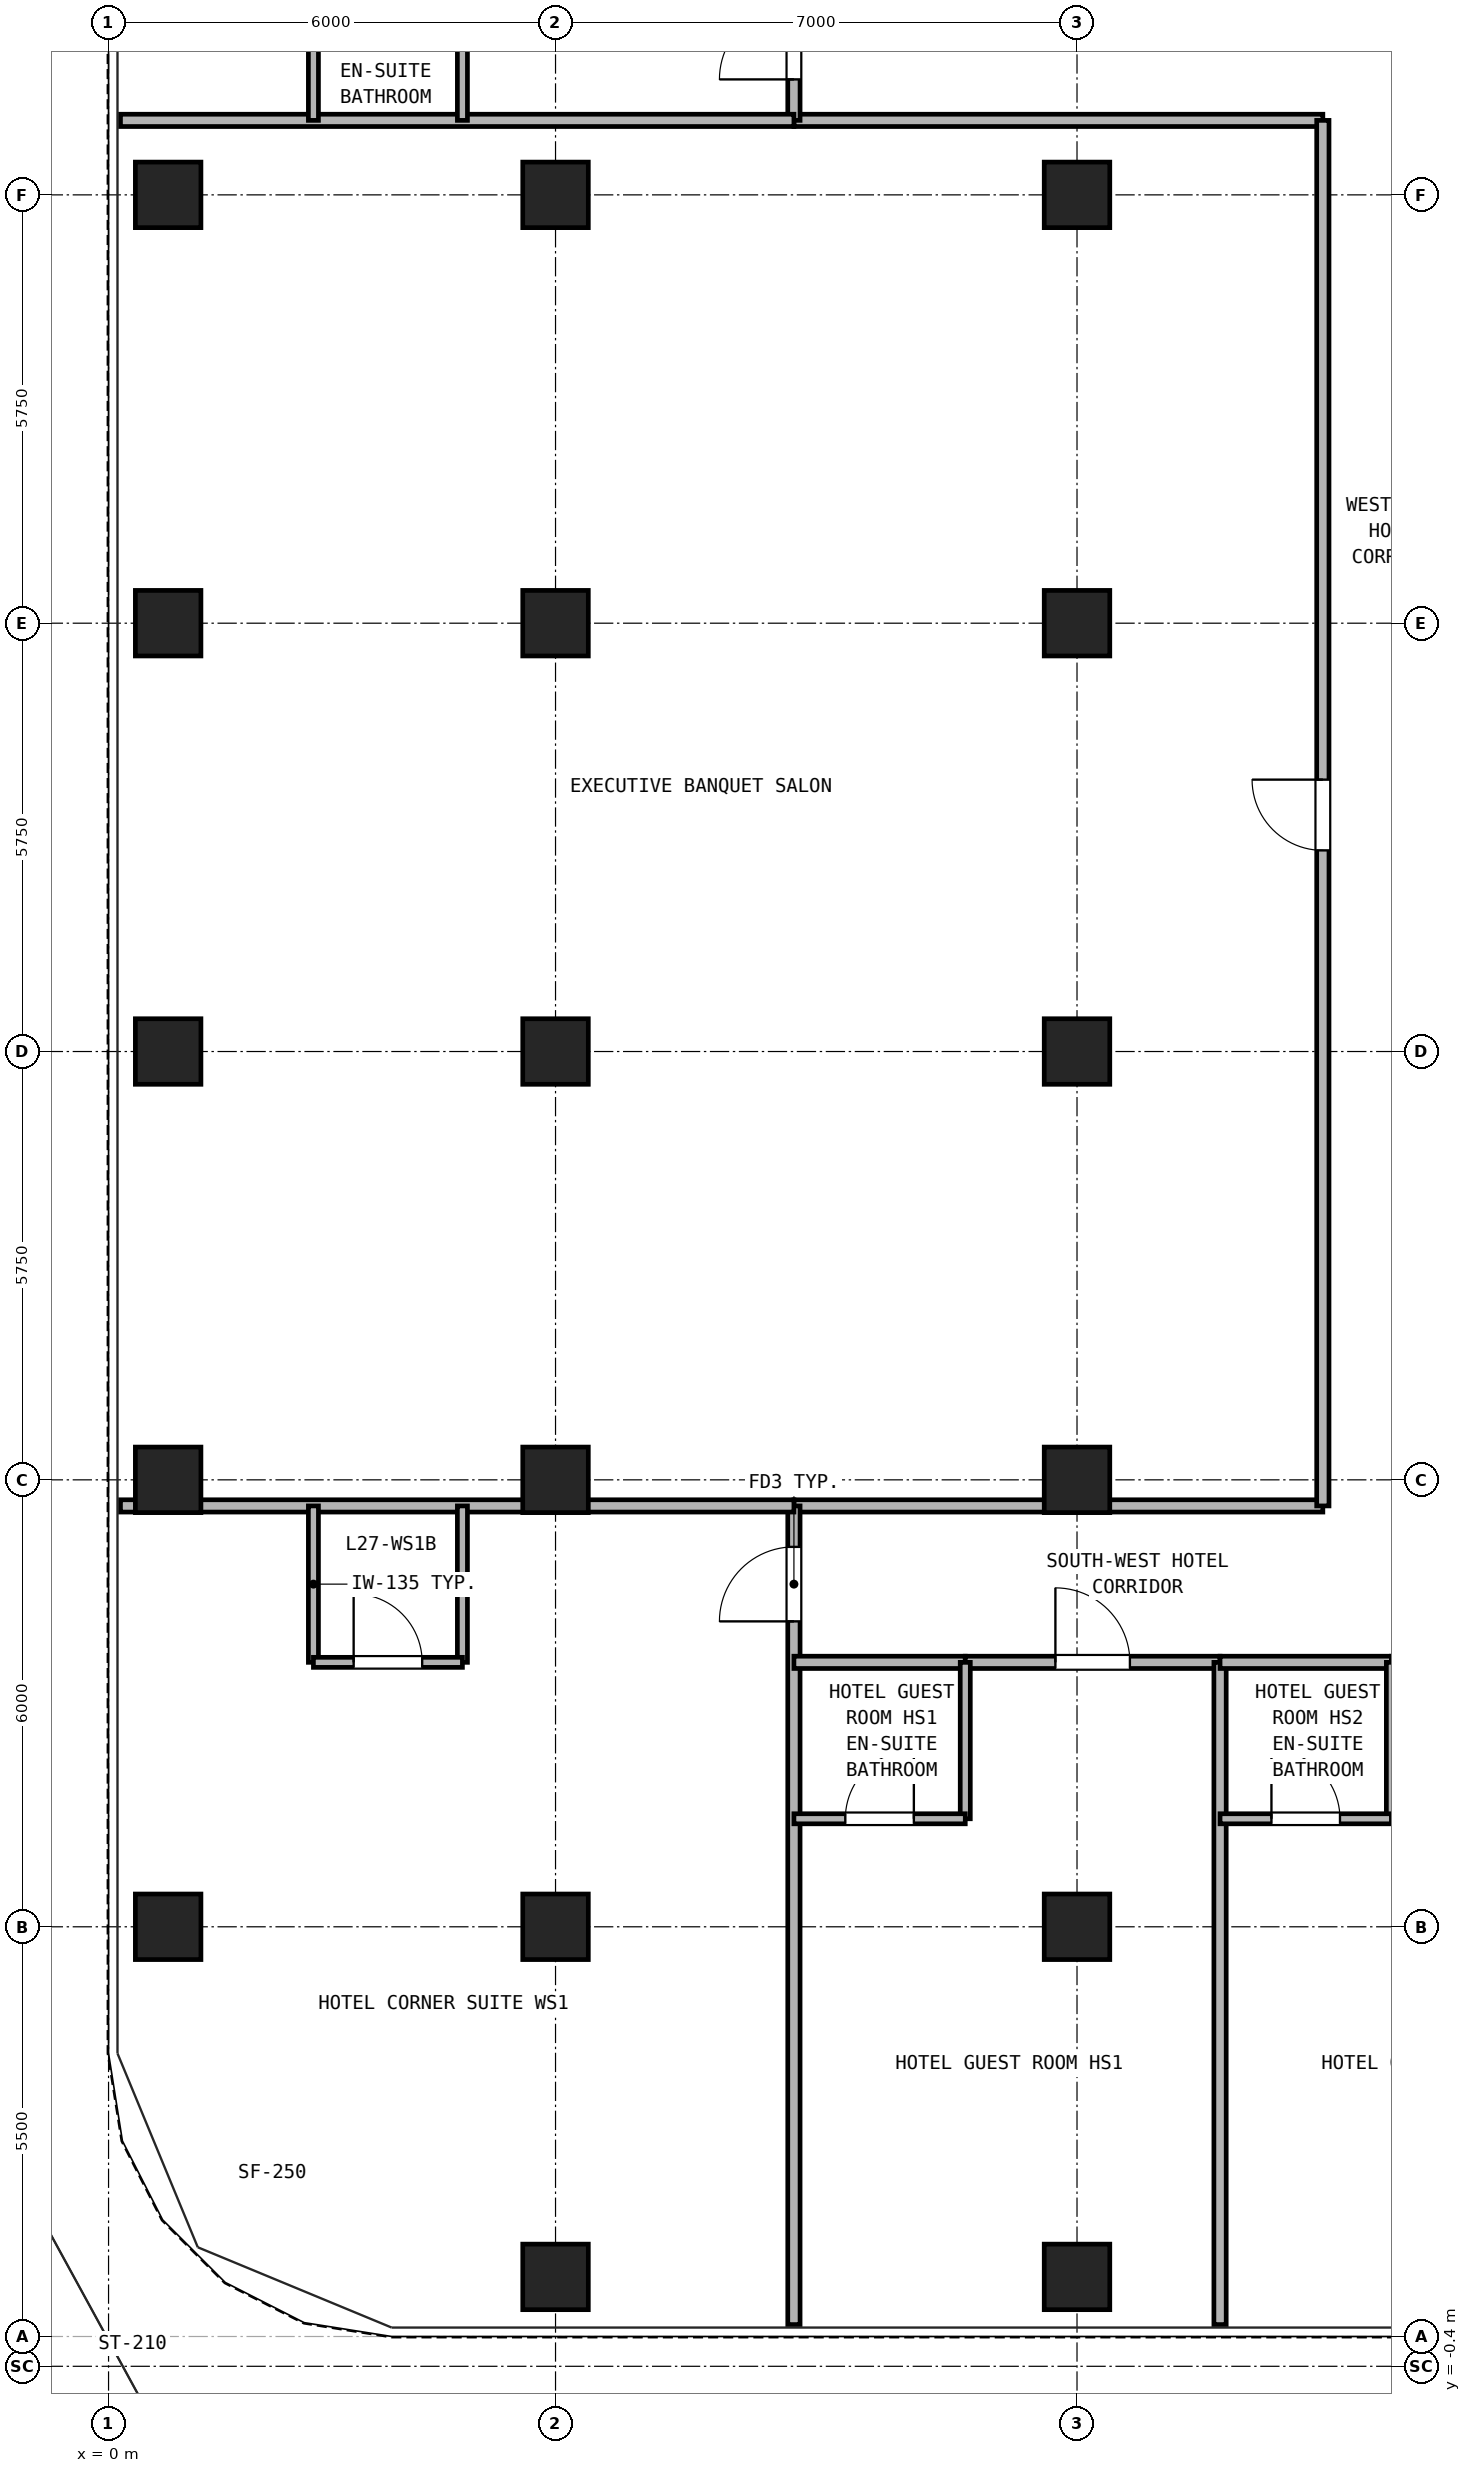
"""IFC4 building model, lengths in metres.
Left out: names, types, materials, properties, quantities, classifications, styles, units other than length and angle.
Written with IfcOpenShell. Run it as: python <this file> out.ifc"""

import sys

from ifc_helpers import new_model, si_unit, direction, frame, frame_2d, origin, origin_2d, place, context, subcontext, project, spatial, rectangle, hollow_rectangle, extrude, source, transform, mapped, element, fill, save


model = new_model("IFC4")
c1 = context("Model", 3, precision=1e-05, world=origin(), true_north=direction((0.0, 1.0)))
c2 = subcontext(c1, "Body", "Model", "MODEL_VIEW")
j1 = project(units=[si_unit("LENGTHUNIT", "METRE"), si_unit("PLANEANGLEUNIT", "RADIAN")], contexts=[c1])
p1 = place(None, origin())
s1 = spatial("IfcSite", under=j1, at=p1, CompositionType="ELEMENT")
p2 = place(p1, origin())
s2 = spatial("IfcBuilding", under=s1, at=p2, CompositionType="ELEMENT")
p3 = place(p2, frame((0.0, 0.0, 102.3)))
s3 = spatial("IfcBuildingStorey", under=s2, at=p3, CompositionType="ELEMENT", Elevation=102.3)
m1 = source(origin(), c2, "Body", "SweptSolid", [
    extrude(hollow_rectangle(XDim=0.88, YDim=0.88, WallThickness=0.05, at=origin_2d()), origin(), (0.0, 0.0, 1.0), 2.95),
])
for number, where, z_axis, x_axis in (
    (1, (6.0, 0.8, 0.0), (0.0, 0.0, 1.0), (1.0, 0.0, 0.0)),
    (2, (13.0, 0.8, 0.0), (0.0, 0.0, 1.0), (1.0, 0.0, 0.0)),
    (3, (0.8, 5.5, 0.0), (0.0, 0.0, 1.0), (1.0, 0.0, 0.0)),
    (4, (0.8, 11.5, 0.0), (0.0, 0.0, 1.0), (1.0, 0.0, 0.0)),
    (5, (0.8, 17.25, 0.0), (0.0, 0.0, 1.0), (1.0, 0.0, 0.0)),
    (6, (0.8, 23.0, 0.0), (0.0, 0.0, 1.0), (1.0, 0.0, 0.0)),
    (7, (0.8, 28.75, 0.0), (0.0, 0.0, 1.0), (1.0, 0.0, 0.0)),
    (8, (6.0, 5.5, 0.0), (0.0, 0.0, 1.0), (1.0, 0.0, 0.0)),
    (9, (6.0, 11.5, 0.0), (0.0, 0.0, 1.0), (1.0, 0.0, 0.0)),
    (10, (6.0, 17.25, 0.0), (0.0, 0.0, 1.0), (1.0, 0.0, 0.0)),
    (11, (6.0, 23.0, 0.0), (0.0, 0.0, 1.0), (1.0, 0.0, 0.0)),
    (12, (6.0, 28.75, 0.0), (0.0, 0.0, 1.0), (1.0, 0.0, 0.0)),
    (13, (13.0, 5.5, 0.0), (0.0, 0.0, 1.0), (1.0, 0.0, 0.0)),
    (14, (13.0, 11.5, 0.0), (0.0, 0.0, 1.0), (1.0, 0.0, 0.0)),
    (15, (13.0, 17.25, 0.0), (0.0, 0.0, 1.0), (1.0, 0.0, 0.0)),
    (16, (13.0, 23.0, 0.0), (0.0, 0.0, 1.0), (1.0, 0.0, 0.0)),
    (17, (13.0, 28.75, 0.0), (0.0, 0.0, 1.0), (1.0, 0.0, 0.0)),
):
    element("IfcColumn", number, at=place(p3, frame(where, z_axis=z_axis, x_axis=x_axis)), inside=s3, PredefinedType="COLUMN", context=c2, shape_type="MappedRepresentation", body=[
        mapped(m1, transform((0.0, 0.0, 0.0), x_axis=(1.0, 0.0, 0.0), y_axis=(0.0, 1.0, 0.0), z_axis=(0.0, 0.0, 1.0), scale=1.0)),
    ])
for number, where, z_axis, x_axis in (
    (18, (9.2, 11.15, 0.0), (0.0, 0.0, 1.0), (1.0, 0.0, 0.0)),
    (19, (9.2, 29.75, 0.0), (0.0, 0.0, 1.0), (1.0, 0.0, 0.0)),
):
    element("IfcWall", number, at=place(p3, frame(where, z_axis=z_axis, x_axis=x_axis)), inside=s3, PredefinedType="PARTITIONING", context=c2, shape_type="SweptSolid", body=[
        extrude(rectangle(XDim=7.1, YDim=0.165, at=frame_2d((3.55, 0.0))), origin(), (0.0, 0.0, 1.0), 2.95),
    ])
p4 = place(p3, frame((16.3, 11.15, 0.0), z_axis=(0.0, 0.0, 1.0), x_axis=(0.0, 1.0, 0.0)))
e20 = element("IfcWall", 20, at=p4, inside=s3, PredefinedType="PARTITIONING", context=c2, shape_type="SweptSolid", body=[
    extrude(rectangle(XDim=18.6, YDim=0.165, at=frame_2d((9.3, 0.0))), origin(), (0.0, 0.0, 1.0), 2.95),
])
p5 = place(p4, frame((8.8, 0.0, 0.0)))
e21 = element("IfcOpeningElement", 21, at=p5, cuts=e20, PredefinedType="OPENING", context=c2, shape_type="SweptSolid", body=[
    extrude(rectangle(XDim=0.95, YDim=2.15, at=frame_2d((0.475, 1.075))), frame((0.0, 0.093, 0.0), z_axis=(0.0, -1.0, 0.0), x_axis=(1.0, 0.0, 0.0)), (0.0, 0.0, 1.0), 0.185),
])
p6 = place(p3, frame((9.2, 0.16, 0.0), z_axis=(0.0, 0.0, 1.0), x_axis=(0.0, 1.0, 0.0)))
e22 = element("IfcWall", 22, at=p6, inside=s3, PredefinedType="PARTITIONING", context=c2, shape_type="SweptSolid", body=[
    extrude(rectangle(XDim=10.99, YDim=0.165, at=frame_2d((5.495, 0.0))), origin(), (0.0, 0.0, 1.0), 2.95),
])
p7 = place(p6, frame((9.44, 0.0, 0.0)))
e23 = element("IfcOpeningElement", 23, at=p7, cuts=e22, PredefinedType="OPENING", context=c2, shape_type="SweptSolid", body=[
    extrude(rectangle(XDim=1.0, YDim=2.15, at=frame_2d((0.5, 1.075))), frame((0.0, 0.093, 0.0), z_axis=(0.0, -1.0, 0.0), x_axis=(1.0, 0.0, 0.0)), (0.0, 0.0, 1.0), 0.185),
])
p8 = place(p3, frame((9.2, 29.75, 0.0), z_axis=(0.0, 0.0, 1.0), x_axis=(0.0, 1.0, 0.0)))
e24 = element("IfcWall", 24, at=p8, inside=s3, PredefinedType="PARTITIONING", context=c2, shape_type="SweptSolid", body=[
    extrude(rectangle(XDim=5.39, YDim=0.165, at=frame_2d((2.695, 0.0))), origin(), (0.0, 0.0, 1.0), 2.95),
])
p9 = place(p8, frame((0.55, 0.0, 0.0)))
e25 = element("IfcOpeningElement", 25, at=p9, cuts=e24, PredefinedType="OPENING", context=c2, shape_type="SweptSolid", body=[
    extrude(rectangle(XDim=1.0, YDim=2.15, at=frame_2d((0.5, 1.075))), frame((0.0, 0.093, 0.0), z_axis=(0.0, -1.0, 0.0), x_axis=(1.0, 0.0, 0.0)), (0.0, 0.0, 1.0), 0.185),
])
for number, where, z_axis, x_axis in (
    (26, (0.16, 11.15, 0.0), (0.0, 0.0, 1.0), (1.0, 0.0, 0.0)),
    (27, (0.16, 29.75, 0.0), (0.0, 0.0, 1.0), (1.0, 0.0, 0.0)),
):
    element("IfcWall", number, at=place(p3, frame(where, z_axis=z_axis, x_axis=x_axis)), inside=s3, PredefinedType="PARTITIONING", context=c2, shape_type="SweptSolid", body=[
        extrude(rectangle(XDim=9.04, YDim=0.165, at=frame_2d((4.52, 0.0))), origin(), (0.0, 0.0, 1.0), 2.95),
    ])
for number, where, z_axis, x_axis in (
    (28, (2.75, 9.05, 0.0), (0.0, 0.0, 1.0), (0.0, 1.0, 0.0)),
    (29, (4.75, 9.05, 0.0), (0.0, 0.0, 1.0), (0.0, 1.0, 0.0)),
):
    element("IfcWall", number, at=place(p3, frame(where, z_axis=z_axis, x_axis=x_axis)), inside=s3, PredefinedType="PARTITIONING", context=c2, shape_type="SweptSolid", body=[
        extrude(rectangle(XDim=2.1, YDim=0.135, at=frame_2d((1.05, 0.0))), origin(), (0.0, 0.0, 1.0), 2.95),
    ])
p10 = place(p3, frame((2.75, 9.05, 0.0), z_axis=(0.0, 0.0, 1.0), x_axis=(1.0, 0.0, 0.0)))
e30 = element("IfcWall", 30, at=p10, inside=s3, PredefinedType="PARTITIONING", context=c2, shape_type="SweptSolid", body=[
    extrude(rectangle(XDim=2.0, YDim=0.135, at=frame_2d((1.0, 0.0))), origin(), (0.0, 0.0, 1.0), 2.95),
])
p11 = place(p10, frame((0.54, 0.0, 0.0)))
e31 = element("IfcOpeningElement", 31, at=p11, cuts=e30, PredefinedType="OPENING", context=c2, shape_type="SweptSolid", body=[
    extrude(rectangle(XDim=0.92, YDim=2.1, at=frame_2d((0.46, 1.05))), frame((0.0, 0.077, 0.0), z_axis=(0.0, -1.0, 0.0), x_axis=(1.0, 0.0, 0.0)), (0.0, 0.0, 1.0), 0.155),
])
for number, where, z_axis, x_axis in (
    (32, (2.75, 29.75, 0.0), (0.0, 0.0, 1.0), (0.0, 1.0, 0.0)),
    (33, (4.75, 29.75, 0.0), (0.0, 0.0, 1.0), (0.0, 1.0, 0.0)),
):
    element("IfcWall", number, at=place(p3, frame(where, z_axis=z_axis, x_axis=x_axis)), inside=s3, PredefinedType="PARTITIONING", context=c2, shape_type="SweptSolid", body=[
        extrude(rectangle(XDim=2.1, YDim=0.135, at=frame_2d((1.05, 0.0))), origin(), (0.0, 0.0, 1.0), 2.95),
    ])
p12 = place(p3, frame((9.2, 9.05, 0.0), z_axis=(0.0, 0.0, 1.0), x_axis=(1.0, 0.0, 0.0)))
e34 = element("IfcWall", 34, at=p12, inside=s3, PredefinedType="PARTITIONING", context=c2, shape_type="SweptSolid", body=[
    extrude(rectangle(XDim=2.3, YDim=0.165, at=frame_2d((1.15, 0.0))), origin(), (0.0, 0.0, 1.0), 2.95),
])
p13 = place(p3, frame((11.5, 9.05, 0.0), z_axis=(0.0, 0.0, 1.0), x_axis=(1.0, 0.0, 0.0)))
e35 = element("IfcWall", 35, at=p13, inside=s3, PredefinedType="PARTITIONING", context=c2, shape_type="SweptSolid", body=[
    extrude(rectangle(XDim=3.42, YDim=0.165, at=frame_2d((1.71, 0.0))), origin(), (0.0, 0.0, 1.0), 2.95),
])
p14 = place(p13, frame((1.21, 0.0, 0.0)))
e36 = element("IfcOpeningElement", 36, at=p14, cuts=e35, PredefinedType="OPENING", context=c2, shape_type="SweptSolid", body=[
    extrude(rectangle(XDim=1.0, YDim=2.15, at=frame_2d((0.5, 1.075))), frame((0.0, 0.093, 0.0), z_axis=(0.0, -1.0, 0.0), x_axis=(1.0, 0.0, 0.0)), (0.0, 0.0, 1.0), 0.185),
])
p15 = place(p3, frame((11.5, 6.95, 0.0), z_axis=(0.0, 0.0, 1.0), x_axis=(0.0, 1.0, 0.0)))
e37 = element("IfcWall", 37, at=p15, inside=s3, PredefinedType="PARTITIONING", context=c2, shape_type="SweptSolid", body=[
    extrude(rectangle(XDim=2.1, YDim=0.135, at=frame_2d((1.05, 0.0))), origin(), (0.0, 0.0, 1.0), 2.95),
])
p16 = place(p3, frame((9.2, 6.95, 0.0), z_axis=(0.0, 0.0, 1.0), x_axis=(1.0, 0.0, 0.0)))
e38 = element("IfcWall", 38, at=p16, inside=s3, PredefinedType="PARTITIONING", context=c2, shape_type="SweptSolid", body=[
    extrude(rectangle(XDim=2.3, YDim=0.135, at=frame_2d((1.15, 0.0))), origin(), (0.0, 0.0, 1.0), 2.95),
])
p17 = place(p16, frame((0.69, 0.0, 0.0)))
e39 = element("IfcOpeningElement", 39, at=p17, cuts=e38, PredefinedType="OPENING", context=c2, shape_type="SweptSolid", body=[
    extrude(rectangle(XDim=0.92, YDim=2.1, at=frame_2d((0.46, 1.05))), frame((0.0, 0.077, 0.0), z_axis=(0.0, -1.0, 0.0), x_axis=(1.0, 0.0, 0.0)), (0.0, 0.0, 1.0), 0.155),
])
p18 = place(p3, frame((14.92, 0.16, 0.0), z_axis=(0.0, 0.0, 1.0), x_axis=(0.0, 1.0, 0.0)))
e40 = element("IfcWall", 40, at=p18, inside=s3, PredefinedType="PARTITIONING", context=c2, shape_type="SweptSolid", body=[
    extrude(rectangle(XDim=8.89, YDim=0.165, at=frame_2d((4.445, 0.0))), origin(), (0.0, 0.0, 1.0), 2.95),
])
p19 = place(p3, frame((14.92, 9.05, 0.0), z_axis=(0.0, 0.0, 1.0), x_axis=(1.0, 0.0, 0.0)))
e41 = element("IfcWall", 41, at=p19, inside=s3, PredefinedType="PARTITIONING", context=c2, shape_type="SweptSolid", body=[
    extrude(rectangle(XDim=2.3, YDim=0.165, at=frame_2d((1.15, 0.0))), origin(), (0.0, 0.0, 1.0), 2.95),
])
p20 = place(p3, frame((17.22, 6.95, 0.0), z_axis=(0.0, 0.0, 1.0), x_axis=(0.0, 1.0, 0.0)))
e42 = element("IfcWall", 42, at=p20, inside=s3, PredefinedType="PARTITIONING", context=c2, shape_type="SweptSolid", body=[
    extrude(rectangle(XDim=2.1, YDim=0.135, at=frame_2d((1.05, 0.0))), origin(), (0.0, 0.0, 1.0), 2.95),
])
p21 = place(p3, frame((14.92, 6.95, 0.0), z_axis=(0.0, 0.0, 1.0), x_axis=(1.0, 0.0, 0.0)))
e43 = element("IfcWall", 43, at=p21, inside=s3, PredefinedType="PARTITIONING", context=c2, shape_type="SweptSolid", body=[
    extrude(rectangle(XDim=2.3, YDim=0.135, at=frame_2d((1.15, 0.0))), origin(), (0.0, 0.0, 1.0), 2.95),
])
p22 = place(p21, frame((0.69, 0.0, 0.0)))
e44 = element("IfcOpeningElement", 44, at=p22, cuts=e43, PredefinedType="OPENING", context=c2, shape_type="SweptSolid", body=[
    extrude(rectangle(XDim=0.92, YDim=2.1, at=frame_2d((0.46, 1.05))), frame((0.0, 0.077, 0.0), z_axis=(0.0, -1.0, 0.0), x_axis=(1.0, 0.0, 0.0)), (0.0, 0.0, 1.0), 0.155),
])
p23 = place(p11, origin())
e45 = element("IfcDoor", 45, at=p23, inside=s3, OperationType="SINGLE_SWING_LEFT", PredefinedType="DOOR", context=c2, shape_type="SweptSolid", body=[
    extrude(rectangle(XDim=0.92, YDim=2.1, at=frame_2d((0.46, 1.05))), frame((0.0, 0.025, 0.0), z_axis=(0.0, -1.0, 0.0), x_axis=(1.0, 0.0, 0.0)), (0.0, 0.0, 1.0), 0.05),
])
fill(e31, e45)
p24 = place(p7, origin())
e46 = element("IfcDoor", 46, at=p24, inside=s3, OperationType="SINGLE_SWING_LEFT", PredefinedType="DOOR", context=c2, shape_type="SweptSolid", body=[
    extrude(rectangle(XDim=1.0, YDim=2.15, at=frame_2d((0.5, 1.075))), frame((0.0, 0.025, 0.0), z_axis=(0.0, -1.0, 0.0), x_axis=(1.0, 0.0, 0.0)), (0.0, 0.0, 1.0), 0.05),
])
fill(e23, e46)
p25 = place(p9, origin())
e47 = element("IfcDoor", 47, at=p25, inside=s3, OperationType="SINGLE_SWING_LEFT", PredefinedType="DOOR", context=c2, shape_type="SweptSolid", body=[
    extrude(rectangle(XDim=1.0, YDim=2.15, at=frame_2d((0.5, 1.075))), frame((0.0, 0.025, 0.0), z_axis=(0.0, -1.0, 0.0), x_axis=(1.0, 0.0, 0.0)), (0.0, 0.0, 1.0), 0.05),
])
fill(e25, e47)
p26 = place(p17, origin())
e48 = element("IfcDoor", 48, at=p26, inside=s3, OperationType="SINGLE_SWING_RIGHT", PredefinedType="DOOR", context=c2, shape_type="SweptSolid", body=[
    extrude(rectangle(XDim=0.92, YDim=2.1, at=frame_2d((0.46, 1.05))), frame((0.0, 0.025, 0.0), z_axis=(0.0, -1.0, 0.0), x_axis=(1.0, 0.0, 0.0)), (0.0, 0.0, 1.0), 0.05),
])
fill(e39, e48)
p27 = place(p14, frame((1.0, 0.0, 0.0), z_axis=(0.0, 0.0, 1.0), x_axis=(-1.0, 0.0, 0.0)))
e49 = element("IfcDoor", 49, at=p27, inside=s3, OperationType="SINGLE_SWING_LEFT", PredefinedType="DOOR", context=c2, shape_type="SweptSolid", body=[
    extrude(rectangle(XDim=1.0, YDim=2.15, at=frame_2d((0.5, 1.075))), frame((0.0, 0.025, 0.0), z_axis=(0.0, -1.0, 0.0), x_axis=(1.0, 0.0, 0.0)), (0.0, 0.0, 1.0), 0.05),
])
fill(e36, e49)
p28 = place(p22, origin())
e50 = element("IfcDoor", 50, at=p28, inside=s3, OperationType="SINGLE_SWING_LEFT", PredefinedType="DOOR", context=c2, shape_type="SweptSolid", body=[
    extrude(rectangle(XDim=0.92, YDim=2.1, at=frame_2d((0.46, 1.05))), frame((0.0, 0.025, 0.0), z_axis=(0.0, -1.0, 0.0), x_axis=(1.0, 0.0, 0.0)), (0.0, 0.0, 1.0), 0.05),
])
fill(e44, e50)
p29 = place(p5, frame((0.95, 0.0, 0.0), z_axis=(0.0, 0.0, 1.0), x_axis=(-1.0, 0.0, 0.0)))
e51 = element("IfcDoor", 51, at=p29, inside=s3, OperationType="SINGLE_SWING_RIGHT", PredefinedType="DOOR", context=c2, shape_type="SweptSolid", body=[
    extrude(rectangle(XDim=0.95, YDim=2.15, at=frame_2d((0.475, 1.075))), frame((0.0, 0.025, 0.0), z_axis=(0.0, -1.0, 0.0), x_axis=(1.0, 0.0, 0.0)), (0.0, 0.0, 1.0), 0.05),
])
fill(e21, e51)
save(model, sys.argv[1])
